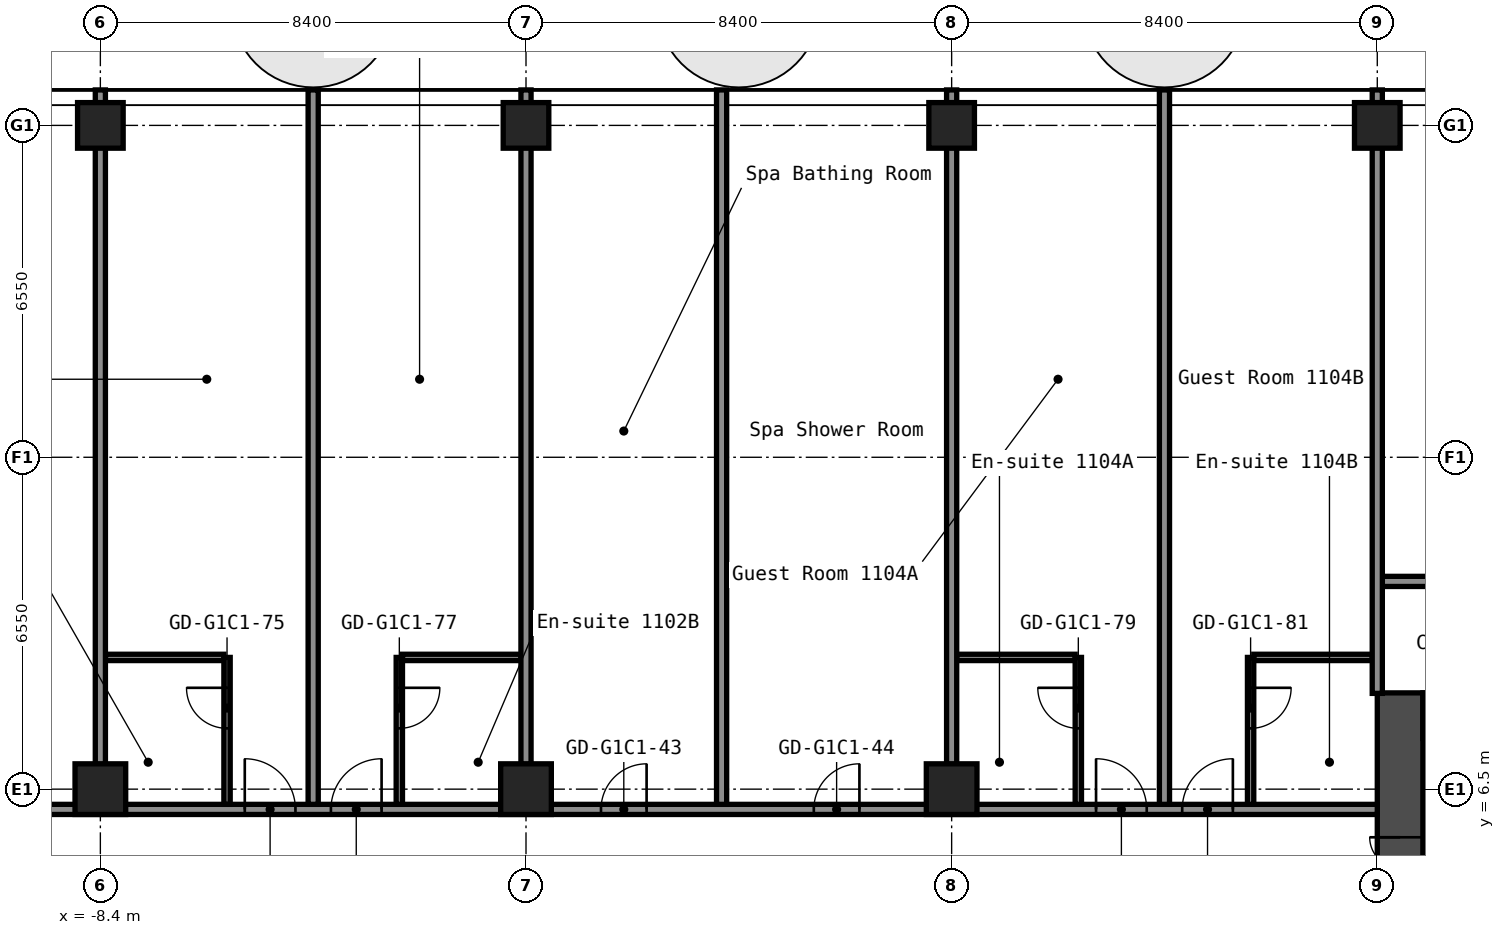
"""IFC4 building model, lengths in metres.
Left out: names, types, materials, properties, quantities, classifications, styles, units other than length and angle.
Written with IfcOpenShell. Run it as: python <this file> out.ifc"""

import sys

from ifc_helpers import new_model, si_unit, direction, frame, frame_2d, origin, origin_2d, place, context, subcontext, project, spatial, rectangle, hollow_rectangle, extrude, element, fill, save


model = new_model("IFC4")
c1 = context("Model", 3, precision=1e-05, world=origin(), true_north=direction((0.0, 1.0)))
c2 = subcontext(c1, "Body", "Model", "MODEL_VIEW")
j1 = project(units=[si_unit("LENGTHUNIT", "METRE"), si_unit("PLANEANGLEUNIT", "RADIAN")], contexts=[c1])
p1 = place(None, origin())
s1 = spatial("IfcSite", under=j1, at=p1, CompositionType="ELEMENT")
p2 = place(p1, origin())
s2 = spatial("IfcBuilding", under=s1, at=p2, CompositionType="ELEMENT")
p3 = place(p2, frame((0.0, 0.0, 42.2)))
s3 = spatial("IfcBuildingStorey", under=s2, at=p3, CompositionType="ELEMENT", Elevation=42.2)
p4 = place(p3, frame((-8.4, 6.5, 0.0), z_axis=(0.0, 0.0, 1.0), x_axis=(1.0, 0.0, 0.0)))
e1 = element("IfcColumn", 1, at=p4, inside=s3, PredefinedType="COLUMN", context=c2, shape_type="SweptSolid", body=[
    extrude(hollow_rectangle(XDim=1.0, YDim=1.0, WallThickness=0.04, at=origin_2d()), origin(), (0.0, 0.0, 1.0), 2.8),
])
p5 = place(p3, frame((-8.4, 19.6, 0.0), z_axis=(0.0, 0.0, 1.0), x_axis=(1.0, 0.0, 0.0)))
e2 = element("IfcColumn", 2, at=p5, inside=s3, PredefinedType="COLUMN", context=c2, shape_type="SweptSolid", body=[
    extrude(hollow_rectangle(XDim=0.9, YDim=0.9, WallThickness=0.036, at=origin_2d()), origin(), (0.0, 0.0, 1.0), 2.8),
])
p6 = place(p3, frame((0.0, 6.5, 0.0), z_axis=(0.0, 0.0, 1.0), x_axis=(1.0, 0.0, 0.0)))
e3 = element("IfcColumn", 3, at=p6, inside=s3, PredefinedType="COLUMN", context=c2, shape_type="SweptSolid", body=[
    extrude(hollow_rectangle(XDim=1.0, YDim=1.0, WallThickness=0.04, at=origin_2d()), origin(), (0.0, 0.0, 1.0), 2.8),
])
p7 = place(p3, frame((0.0, 19.6, 0.0), z_axis=(0.0, 0.0, 1.0), x_axis=(1.0, 0.0, 0.0)))
e4 = element("IfcColumn", 4, at=p7, inside=s3, PredefinedType="COLUMN", context=c2, shape_type="SweptSolid", body=[
    extrude(hollow_rectangle(XDim=0.9, YDim=0.9, WallThickness=0.036, at=origin_2d()), origin(), (0.0, 0.0, 1.0), 2.8),
])
p8 = place(p3, frame((8.4, 6.5, 0.0), z_axis=(0.0, 0.0, 1.0), x_axis=(1.0, 0.0, 0.0)))
e5 = element("IfcColumn", 5, at=p8, inside=s3, PredefinedType="COLUMN", context=c2, shape_type="SweptSolid", body=[
    extrude(hollow_rectangle(XDim=1.0, YDim=1.0, WallThickness=0.04, at=origin_2d()), origin(), (0.0, 0.0, 1.0), 2.8),
])
for number, where, z_axis, x_axis in (
    (6, (8.4, 19.6, 0.0), (0.0, 0.0, 1.0), (1.0, 0.0, 0.0)),
    (7, (16.8, 19.6, 0.0), (0.0, 0.0, 1.0), (1.0, 0.0, 0.0)),
):
    element("IfcColumn", number, at=place(p3, frame(where, z_axis=z_axis, x_axis=x_axis)), inside=s3, PredefinedType="COLUMN", context=c2, shape_type="SweptSolid", body=[
        extrude(hollow_rectangle(XDim=0.9, YDim=0.9, WallThickness=0.036, at=origin_2d()), origin(), (0.0, 0.0, 1.0), 2.8),
    ])
p9 = place(p3, frame((17.25, -8.4, 0.0), z_axis=(0.0, 0.0, 1.0), x_axis=(0.0, 1.0, 0.0)))
e8 = element("IfcWall", 8, at=p9, inside=s3, PredefinedType="SHEAR", context=c2, shape_type="SweptSolid", body=[
    extrude(rectangle(XDim=16.8, YDim=0.9, at=frame_2d((8.4, 0.0))), origin(), (0.0, 0.0, 1.0), 2.8),
])
p10 = place(p9, frame((12.75, 0.0, 0.0)))
e9 = element("IfcOpeningElement", 9, at=p10, cuts=e8, PredefinedType="OPENING", context=c2, shape_type="SweptSolid", body=[
    extrude(rectangle(XDim=1.2, YDim=2.1, at=frame_2d((0.6, 1.05))), frame((0.0, 0.46, 0.0), z_axis=(0.0, -1.0, 0.0), x_axis=(1.0, 0.0, 0.0)), (0.0, 0.0, 1.0), 0.92),
])
p11 = place(p9, frame((2.85, 0.0, 0.0)))
e10 = element("IfcOpeningElement", 10, at=p11, cuts=e8, PredefinedType="OPENING", context=c2, shape_type="SweptSolid", body=[
    extrude(rectangle(XDim=1.2, YDim=2.1, at=frame_2d((0.6, 1.05))), frame((0.0, 0.46, 0.0), z_axis=(0.0, -1.0, 0.0), x_axis=(1.0, 0.0, 0.0)), (0.0, 0.0, 1.0), 0.92),
])
p12 = place(p3, frame((17.7, 7.95, 0.0), z_axis=(0.0, 0.0, 1.0), x_axis=(1.0, 0.0, 0.0)))
e11 = element("IfcWall", 11, at=p12, inside=s3, PredefinedType="SHEAR", context=c2, shape_type="SweptSolid", body=[
    extrude(rectangle(XDim=15.0, YDim=0.9, at=frame_2d((7.5, 0.0))), origin(), (0.0, 0.0, 1.0), 2.8),
])
p13 = place(p12, frame((10.4, 0.0, 0.0)))
e12 = element("IfcOpeningElement", 12, at=p13, cuts=e11, PredefinedType="OPENING", context=c2, shape_type="SweptSolid", body=[
    extrude(rectangle(XDim=1.2, YDim=2.1, at=frame_2d((0.6, 1.05))), frame((0.0, 0.46, 0.0), z_axis=(0.0, -1.0, 0.0), x_axis=(1.0, 0.0, 0.0)), (0.0, 0.0, 1.0), 0.92),
])
p14 = place(p12, frame((13.35, 0.0, 0.0)))
e13 = element("IfcOpeningElement", 13, at=p14, cuts=e11, PredefinedType="OPENING", context=c2, shape_type="SweptSolid", body=[
    extrude(rectangle(XDim=0.9, YDim=2.1, at=frame_2d((0.45, 1.05))), frame((0.0, 0.46, 0.0), z_axis=(0.0, -1.0, 0.0), x_axis=(1.0, 0.0, 0.0)), (0.0, 0.0, 1.0), 0.92),
])
p15 = place(p3, frame((-16.8, 6.1, 0.0), z_axis=(0.0, 0.0, 1.0), x_axis=(1.0, 0.0, 0.0)))
e14 = element("IfcWall", 14, at=p15, inside=s3, PredefinedType="PARTITIONING", context=c2, shape_type="SweptSolid", body=[
    extrude(rectangle(XDim=33.6, YDim=0.2, at=frame_2d((16.8, 0.0))), origin(), (0.0, 0.0, 1.0), 2.8),
])
p16 = place(p15, frame((5.4, 0.0, 0.0)))
e15 = element("IfcOpeningElement", 15, at=p16, cuts=e14, PredefinedType="OPENING", context=c2, shape_type="SweptSolid", body=[
    extrude(rectangle(XDim=1.0, YDim=2.1, at=frame_2d((0.5, 1.05))), frame((0.0, 0.11, 0.0), z_axis=(0.0, -1.0, 0.0), x_axis=(1.0, 0.0, 0.0)), (0.0, 0.0, 1.0), 0.22),
])
p17 = place(p15, frame((11.25, 0.0, 0.0)))
e16 = element("IfcOpeningElement", 16, at=p17, cuts=e14, PredefinedType="OPENING", context=c2, shape_type="SweptSolid", body=[
    extrude(rectangle(XDim=1.0, YDim=2.1, at=frame_2d((0.5, 1.05))), frame((0.0, 0.11, 0.0), z_axis=(0.0, -1.0, 0.0), x_axis=(1.0, 0.0, 0.0)), (0.0, 0.0, 1.0), 0.22),
])
p18 = place(p15, frame((12.95, 0.0, 0.0)))
e17 = element("IfcOpeningElement", 17, at=p18, cuts=e14, PredefinedType="OPENING", context=c2, shape_type="SweptSolid", body=[
    extrude(rectangle(XDim=1.0, YDim=2.1, at=frame_2d((0.5, 1.05))), frame((0.0, 0.11, 0.0), z_axis=(0.0, -1.0, 0.0), x_axis=(1.0, 0.0, 0.0)), (0.0, 0.0, 1.0), 0.22),
])
p19 = place(p15, frame((18.28, 0.0, 0.0)))
e18 = element("IfcOpeningElement", 18, at=p19, cuts=e14, PredefinedType="OPENING", context=c2, shape_type="SweptSolid", body=[
    extrude(rectangle(XDim=0.9, YDim=2.1, at=frame_2d((0.45, 1.05))), frame((0.0, 0.11, 0.0), z_axis=(0.0, -1.0, 0.0), x_axis=(1.0, 0.0, 0.0)), (0.0, 0.0, 1.0), 0.22),
])
p20 = place(p15, frame((22.48, 0.0, 0.0)))
e19 = element("IfcOpeningElement", 19, at=p20, cuts=e14, PredefinedType="OPENING", context=c2, shape_type="SweptSolid", body=[
    extrude(rectangle(XDim=0.9, YDim=2.1, at=frame_2d((0.45, 1.05))), frame((0.0, 0.11, 0.0), z_axis=(0.0, -1.0, 0.0), x_axis=(1.0, 0.0, 0.0)), (0.0, 0.0, 1.0), 0.22),
])
p21 = place(p15, frame((28.05, 0.0, 0.0)))
e20 = element("IfcOpeningElement", 20, at=p21, cuts=e14, PredefinedType="OPENING", context=c2, shape_type="SweptSolid", body=[
    extrude(rectangle(XDim=1.0, YDim=2.1, at=frame_2d((0.5, 1.05))), frame((0.0, 0.11, 0.0), z_axis=(0.0, -1.0, 0.0), x_axis=(1.0, 0.0, 0.0)), (0.0, 0.0, 1.0), 0.22),
])
p22 = place(p15, frame((29.75, 0.0, 0.0)))
e21 = element("IfcOpeningElement", 21, at=p22, cuts=e14, PredefinedType="OPENING", context=c2, shape_type="SweptSolid", body=[
    extrude(rectangle(XDim=1.0, YDim=2.1, at=frame_2d((0.5, 1.05))), frame((0.0, 0.11, 0.0), z_axis=(0.0, -1.0, 0.0), x_axis=(1.0, 0.0, 0.0)), (0.0, 0.0, 1.0), 0.22),
])
p23 = place(p3, frame((-8.3, 9.1, 0.0), z_axis=(0.0, 0.0, 1.0), x_axis=(1.0, 0.0, 0.0)))
e22 = element("IfcWall", 22, at=p23, inside=s3, PredefinedType="PARTITIONING", context=c2, shape_type="SweptSolid", body=[
    extrude(rectangle(XDim=2.338, YDim=0.125, at=frame_2d((1.169, 0.0))), origin(), (0.0, 0.0, 1.0), 2.8),
])
for number, where, z_axis, x_axis in (
    (23, (-2.438, 9.1, 0.0), (0.0, 0.0, 1.0), (1.0, 0.0, 0.0)),
    (24, (8.5, 9.1, 0.0), (0.0, 0.0, 1.0), (1.0, 0.0, 0.0)),
    (25, (14.363, 9.1, 0.0), (0.0, 0.0, 1.0), (1.0, 0.0, 0.0)),
):
    element("IfcWall", number, at=place(p3, frame(where, z_axis=z_axis, x_axis=x_axis)), inside=s3, PredefinedType="PARTITIONING", context=c2, shape_type="SweptSolid", body=[
        extrude(rectangle(XDim=2.337, YDim=0.125, at=frame_2d((1.169, 0.0))), origin(), (0.0, 0.0, 1.0), 2.8),
    ])
p24 = place(p3, frame((16.8, 10.6, 0.0), z_axis=(0.0, 0.0, 1.0), x_axis=(1.0, 0.0, 0.0)))
e26 = element("IfcWall", 26, at=p24, inside=s3, PredefinedType="PARTITIONING", context=c2, shape_type="SweptSolid", body=[
    extrude(rectangle(XDim=34.3, YDim=0.2, at=frame_2d((17.15, 0.0))), origin(), (0.0, 0.0, 1.0), 2.8),
])
p25 = place(p24, frame((2.0, 0.0, 0.0)))
e27 = element("IfcOpeningElement", 27, at=p25, cuts=e26, PredefinedType="OPENING", context=c2, shape_type="SweptSolid", body=[
    extrude(rectangle(XDim=1.0, YDim=2.1, at=frame_2d((0.5, 1.05))), frame((0.0, 0.11, 0.0), z_axis=(0.0, -1.0, 0.0), x_axis=(1.0, 0.0, 0.0)), (0.0, 0.0, 1.0), 0.22),
])
p26 = place(p24, frame((11.25, 0.0, 0.0)))
e28 = element("IfcOpeningElement", 28, at=p26, cuts=e26, PredefinedType="OPENING", context=c2, shape_type="SweptSolid", body=[
    extrude(rectangle(XDim=1.0, YDim=2.1, at=frame_2d((0.5, 1.05))), frame((0.0, 0.11, 0.0), z_axis=(0.0, -1.0, 0.0), x_axis=(1.0, 0.0, 0.0)), (0.0, 0.0, 1.0), 0.22),
])
p27 = place(p24, frame((12.95, 0.0, 0.0)))
e29 = element("IfcOpeningElement", 29, at=p27, cuts=e26, PredefinedType="OPENING", context=c2, shape_type="SweptSolid", body=[
    extrude(rectangle(XDim=1.0, YDim=2.1, at=frame_2d((0.5, 1.05))), frame((0.0, 0.11, 0.0), z_axis=(0.0, -1.0, 0.0), x_axis=(1.0, 0.0, 0.0)), (0.0, 0.0, 1.0), 0.22),
])
p28 = place(p24, frame((18.8, 0.0, 0.0)))
e30 = element("IfcOpeningElement", 30, at=p28, cuts=e26, PredefinedType="OPENING", context=c2, shape_type="SweptSolid", body=[
    extrude(rectangle(XDim=1.0, YDim=2.1, at=frame_2d((0.5, 1.05))), frame((0.0, 0.11, 0.0), z_axis=(0.0, -1.0, 0.0), x_axis=(1.0, 0.0, 0.0)), (0.0, 0.0, 1.0), 0.22),
])
p29 = place(p24, frame((28.15, 0.0, 0.0)))
e31 = element("IfcOpeningElement", 31, at=p29, cuts=e26, PredefinedType="OPENING", context=c2, shape_type="SweptSolid", body=[
    extrude(rectangle(XDim=1.0, YDim=2.1, at=frame_2d((0.5, 1.05))), frame((0.0, 0.11, 0.0), z_axis=(0.0, -1.0, 0.0), x_axis=(1.0, 0.0, 0.0)), (0.0, 0.0, 1.0), 0.22),
])
p30 = place(p24, frame((30.05, 0.0, 0.0)))
e32 = element("IfcOpeningElement", 32, at=p30, cuts=e26, PredefinedType="OPENING", context=c2, shape_type="SweptSolid", body=[
    extrude(rectangle(XDim=1.0, YDim=2.1, at=frame_2d((0.5, 1.05))), frame((0.0, 0.11, 0.0), z_axis=(0.0, -1.0, 0.0), x_axis=(1.0, 0.0, 0.0)), (0.0, 0.0, 1.0), 0.22),
])
p31 = place(p3, frame((-8.4, 6.99, 0.0), z_axis=(0.0, 0.0, 1.0), x_axis=(0.0, 1.0, 0.0)))
e33 = element("IfcWall", 33, at=p31, inside=s3, PredefinedType="PARTITIONING", context=c2, shape_type="SweptSolid", body=[
    extrude(rectangle(XDim=13.31, YDim=0.2, at=frame_2d((6.655, 0.0))), origin(), (0.0, 0.0, 1.0), 2.8),
])
p32 = place(p3, frame((-5.9, 6.2, 0.0), z_axis=(0.0, 0.0, 1.0), x_axis=(0.0, 1.0, 0.0)))
e34 = element("IfcWall", 34, at=p32, inside=s3, PredefinedType="PARTITIONING", context=c2, shape_type="SweptSolid", body=[
    extrude(rectangle(XDim=2.9, YDim=0.125, at=frame_2d((1.45, 0.0))), origin(), (0.0, 0.0, 1.0), 2.8),
])
p33 = place(p32, frame((1.5, 0.0, 0.0)))
e35 = element("IfcOpeningElement", 35, at=p33, cuts=e34, PredefinedType="OPENING", context=c2, shape_type="SweptSolid", body=[
    extrude(rectangle(XDim=0.8, YDim=2.1, at=frame_2d((0.4, 1.05))), frame((0.0, 0.073, 0.0), z_axis=(0.0, -1.0, 0.0), x_axis=(1.0, 0.0, 0.0)), (0.0, 0.0, 1.0), 0.145),
])
p34 = place(p3, frame((-4.2, 6.2, 0.0), z_axis=(0.0, 0.0, 1.0), x_axis=(0.0, 1.0, 0.0)))
e36 = element("IfcWall", 36, at=p34, inside=s3, PredefinedType="PARTITIONING", context=c2, shape_type="SweptSolid", body=[
    extrude(rectangle(XDim=14.1, YDim=0.2, at=frame_2d((7.05, 0.0))), origin(), (0.0, 0.0, 1.0), 2.8),
])
p35 = place(p3, frame((-2.5, 6.2, 0.0), z_axis=(0.0, 0.0, 1.0), x_axis=(0.0, 1.0, 0.0)))
e37 = element("IfcWall", 37, at=p35, inside=s3, PredefinedType="PARTITIONING", context=c2, shape_type="SweptSolid", body=[
    extrude(rectangle(XDim=2.9, YDim=0.125, at=frame_2d((1.45, 0.0))), origin(), (0.0, 0.0, 1.0), 2.8),
])
p36 = place(p35, frame((1.5, 0.0, 0.0)))
e38 = element("IfcOpeningElement", 38, at=p36, cuts=e37, PredefinedType="OPENING", context=c2, shape_type="SweptSolid", body=[
    extrude(rectangle(XDim=0.8, YDim=2.1, at=frame_2d((0.4, 1.05))), frame((0.0, 0.073, 0.0), z_axis=(0.0, -1.0, 0.0), x_axis=(1.0, 0.0, 0.0)), (0.0, 0.0, 1.0), 0.145),
])
p37 = place(p3, frame((0.0, 6.99, 0.0), z_axis=(0.0, 0.0, 1.0), x_axis=(0.0, 1.0, 0.0)))
e39 = element("IfcWall", 39, at=p37, inside=s3, PredefinedType="PARTITIONING", context=c2, shape_type="SweptSolid", body=[
    extrude(rectangle(XDim=13.31, YDim=0.2, at=frame_2d((6.655, 0.0))), origin(), (0.0, 0.0, 1.0), 2.8),
])
p38 = place(p3, frame((3.86, 6.2, 0.0), z_axis=(0.0, 0.0, 1.0), x_axis=(0.0, 1.0, 0.0)))
e40 = element("IfcWall", 40, at=p38, inside=s3, PredefinedType="PARTITIONING", context=c2, shape_type="SweptSolid", body=[
    extrude(rectangle(XDim=14.1, YDim=0.2, at=frame_2d((7.05, 0.0))), origin(), (0.0, 0.0, 1.0), 2.8),
])
p39 = place(p3, frame((8.4, 6.99, 0.0), z_axis=(0.0, 0.0, 1.0), x_axis=(0.0, 1.0, 0.0)))
e41 = element("IfcWall", 41, at=p39, inside=s3, PredefinedType="PARTITIONING", context=c2, shape_type="SweptSolid", body=[
    extrude(rectangle(XDim=13.31, YDim=0.2, at=frame_2d((6.655, 0.0))), origin(), (0.0, 0.0, 1.0), 2.8),
])
p40 = place(p3, frame((10.9, 6.2, 0.0), z_axis=(0.0, 0.0, 1.0), x_axis=(0.0, 1.0, 0.0)))
e42 = element("IfcWall", 42, at=p40, inside=s3, PredefinedType="PARTITIONING", context=c2, shape_type="SweptSolid", body=[
    extrude(rectangle(XDim=2.9, YDim=0.125, at=frame_2d((1.45, 0.0))), origin(), (0.0, 0.0, 1.0), 2.8),
])
p41 = place(p40, frame((1.5, 0.0, 0.0)))
e43 = element("IfcOpeningElement", 43, at=p41, cuts=e42, PredefinedType="OPENING", context=c2, shape_type="SweptSolid", body=[
    extrude(rectangle(XDim=0.8, YDim=2.1, at=frame_2d((0.4, 1.05))), frame((0.0, 0.073, 0.0), z_axis=(0.0, -1.0, 0.0), x_axis=(1.0, 0.0, 0.0)), (0.0, 0.0, 1.0), 0.145),
])
p42 = place(p3, frame((12.6, 6.2, 0.0), z_axis=(0.0, 0.0, 1.0), x_axis=(0.0, 1.0, 0.0)))
e44 = element("IfcWall", 44, at=p42, inside=s3, PredefinedType="PARTITIONING", context=c2, shape_type="SweptSolid", body=[
    extrude(rectangle(XDim=14.1, YDim=0.2, at=frame_2d((7.05, 0.0))), origin(), (0.0, 0.0, 1.0), 2.8),
])
p43 = place(p3, frame((14.3, 6.2, 0.0), z_axis=(0.0, 0.0, 1.0), x_axis=(0.0, 1.0, 0.0)))
e45 = element("IfcWall", 45, at=p43, inside=s3, PredefinedType="PARTITIONING", context=c2, shape_type="SweptSolid", body=[
    extrude(rectangle(XDim=2.9, YDim=0.125, at=frame_2d((1.45, 0.0))), origin(), (0.0, 0.0, 1.0), 2.8),
])
p44 = place(p43, frame((1.5, 0.0, 0.0)))
e46 = element("IfcOpeningElement", 46, at=p44, cuts=e45, PredefinedType="OPENING", context=c2, shape_type="SweptSolid", body=[
    extrude(rectangle(XDim=0.8, YDim=2.1, at=frame_2d((0.4, 1.05))), frame((0.0, 0.073, 0.0), z_axis=(0.0, -1.0, 0.0), x_axis=(1.0, 0.0, 0.0)), (0.0, 0.0, 1.0), 0.145),
])
p45 = place(p3, frame((16.8, 8.39, 0.0), z_axis=(0.0, 0.0, 1.0), x_axis=(0.0, 1.0, 0.0)))
e47 = element("IfcWall", 47, at=p45, inside=s3, PredefinedType="PARTITIONING", context=c2, shape_type="SweptSolid", body=[
    extrude(rectangle(XDim=11.91, YDim=0.2, at=frame_2d((5.955, 0.0))), origin(), (0.0, 0.0, 1.0), 2.8),
])
p46 = place(p10, origin())
e48 = element("IfcDoor", 48, at=p46, inside=s3, OperationType="DOUBLE_DOOR_SINGLE_SWING", PredefinedType="DOOR", context=c2, shape_type="SweptSolid", body=[
    extrude(rectangle(XDim=1.2, YDim=2.1, at=frame_2d((0.6, 1.05))), frame((0.0, 0.025, 0.0), z_axis=(0.0, -1.0, 0.0), x_axis=(1.0, 0.0, 0.0)), (0.0, 0.0, 1.0), 0.05),
])
fill(e9, e48)
p47 = place(p17, origin())
e49 = element("IfcDoor", 49, at=p47, inside=s3, OperationType="SINGLE_SWING_RIGHT", PredefinedType="DOOR", context=c2, shape_type="SweptSolid", body=[
    extrude(rectangle(XDim=1.0, YDim=2.1, at=frame_2d((0.5, 1.05))), frame((0.0, 0.025, 0.0), z_axis=(0.0, -1.0, 0.0), x_axis=(1.0, 0.0, 0.0)), (0.0, 0.0, 1.0), 0.05),
])
fill(e16, e49)
p48 = place(p18, origin())
e50 = element("IfcDoor", 50, at=p48, inside=s3, OperationType="SINGLE_SWING_LEFT", PredefinedType="DOOR", context=c2, shape_type="SweptSolid", body=[
    extrude(rectangle(XDim=1.0, YDim=2.1, at=frame_2d((0.5, 1.05))), frame((0.0, 0.025, 0.0), z_axis=(0.0, -1.0, 0.0), x_axis=(1.0, 0.0, 0.0)), (0.0, 0.0, 1.0), 0.05),
])
fill(e17, e50)
p49 = place(p19, origin())
e51 = element("IfcDoor", 51, at=p49, inside=s3, OperationType="SINGLE_SWING_LEFT", PredefinedType="DOOR", context=c2, shape_type="SweptSolid", body=[
    extrude(rectangle(XDim=0.9, YDim=2.1, at=frame_2d((0.45, 1.05))), frame((0.0, 0.025, 0.0), z_axis=(0.0, -1.0, 0.0), x_axis=(1.0, 0.0, 0.0)), (0.0, 0.0, 1.0), 0.05),
])
fill(e18, e51)
p50 = place(p20, origin())
e52 = element("IfcDoor", 52, at=p50, inside=s3, OperationType="SINGLE_SWING_LEFT", PredefinedType="DOOR", context=c2, shape_type="SweptSolid", body=[
    extrude(rectangle(XDim=0.9, YDim=2.1, at=frame_2d((0.45, 1.05))), frame((0.0, 0.025, 0.0), z_axis=(0.0, -1.0, 0.0), x_axis=(1.0, 0.0, 0.0)), (0.0, 0.0, 1.0), 0.05),
])
fill(e19, e52)
p51 = place(p21, origin())
e53 = element("IfcDoor", 53, at=p51, inside=s3, OperationType="SINGLE_SWING_RIGHT", PredefinedType="DOOR", context=c2, shape_type="SweptSolid", body=[
    extrude(rectangle(XDim=1.0, YDim=2.1, at=frame_2d((0.5, 1.05))), frame((0.0, 0.025, 0.0), z_axis=(0.0, -1.0, 0.0), x_axis=(1.0, 0.0, 0.0)), (0.0, 0.0, 1.0), 0.05),
])
fill(e20, e53)
p52 = place(p22, origin())
e54 = element("IfcDoor", 54, at=p52, inside=s3, OperationType="SINGLE_SWING_LEFT", PredefinedType="DOOR", context=c2, shape_type="SweptSolid", body=[
    extrude(rectangle(XDim=1.0, YDim=2.1, at=frame_2d((0.5, 1.05))), frame((0.0, 0.025, 0.0), z_axis=(0.0, -1.0, 0.0), x_axis=(1.0, 0.0, 0.0)), (0.0, 0.0, 1.0), 0.05),
])
fill(e21, e54)
p53 = place(p33, origin())
e55 = element("IfcDoor", 55, at=p53, inside=s3, OperationType="SINGLE_SWING_LEFT", PredefinedType="DOOR", context=c2, shape_type="SweptSolid", body=[
    extrude(rectangle(XDim=0.8, YDim=2.1, at=frame_2d((0.4, 1.05))), frame((0.0, 0.025, 0.0), z_axis=(0.0, -1.0, 0.0), x_axis=(1.0, 0.0, 0.0)), (0.0, 0.0, 1.0), 0.05),
])
fill(e35, e55)
p54 = place(p36, origin())
e56 = element("IfcDoor", 56, at=p54, inside=s3, OperationType="SINGLE_SWING_RIGHT", PredefinedType="DOOR", context=c2, shape_type="SweptSolid", body=[
    extrude(rectangle(XDim=0.8, YDim=2.1, at=frame_2d((0.4, 1.05))), frame((0.0, 0.025, 0.0), z_axis=(0.0, -1.0, 0.0), x_axis=(1.0, 0.0, 0.0)), (0.0, 0.0, 1.0), 0.05),
])
fill(e38, e56)
p55 = place(p41, origin())
e57 = element("IfcDoor", 57, at=p55, inside=s3, OperationType="SINGLE_SWING_LEFT", PredefinedType="DOOR", context=c2, shape_type="SweptSolid", body=[
    extrude(rectangle(XDim=0.8, YDim=2.1, at=frame_2d((0.4, 1.05))), frame((0.0, 0.025, 0.0), z_axis=(0.0, -1.0, 0.0), x_axis=(1.0, 0.0, 0.0)), (0.0, 0.0, 1.0), 0.05),
])
fill(e43, e57)
p56 = place(p44, origin())
e58 = element("IfcDoor", 58, at=p56, inside=s3, OperationType="SINGLE_SWING_RIGHT", PredefinedType="DOOR", context=c2, shape_type="SweptSolid", body=[
    extrude(rectangle(XDim=0.8, YDim=2.1, at=frame_2d((0.4, 1.05))), frame((0.0, 0.025, 0.0), z_axis=(0.0, -1.0, 0.0), x_axis=(1.0, 0.0, 0.0)), (0.0, 0.0, 1.0), 0.05),
])
fill(e46, e58)
save(model, sys.argv[1])
